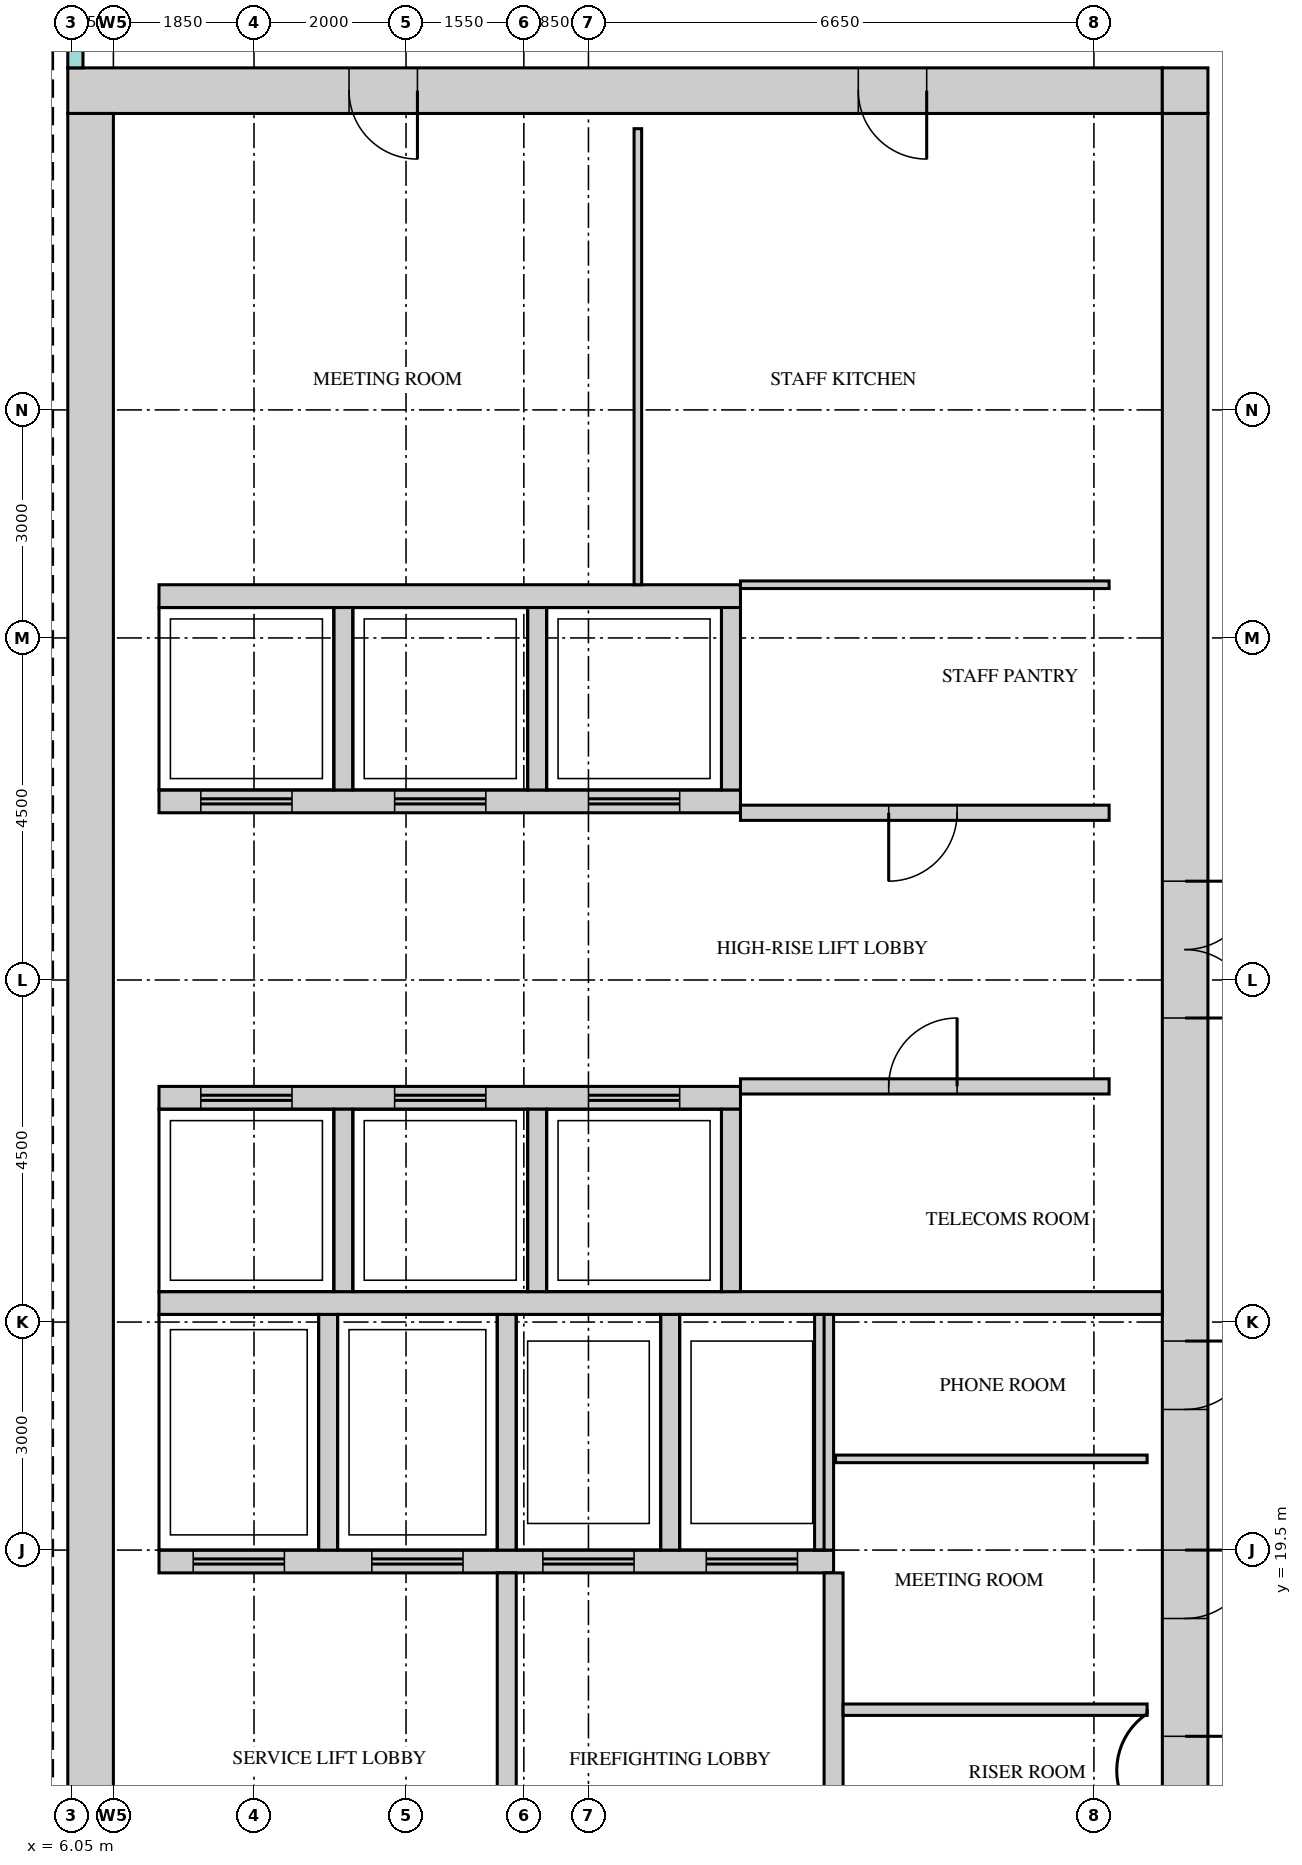
"""IFC4 building model, lengths in metres.
Left out: names, types, materials, properties, quantities, classifications, styles, units other than length and angle.
Written with IfcOpenShell. Run it as: python <this file> out.ifc"""

import sys

from ifc_helpers import new_model, si_unit, direction, frame, frame_2d, origin, place, context, subcontext, project, spatial, rectangle, extrude, source, transform, mapped, element, fill, save


model = new_model("IFC4")
c1 = context("Model", 3, precision=1e-05, world=origin(), true_north=direction((0.0, 1.0)))
c2 = subcontext(c1, "Body", "Model", "MODEL_VIEW")
j1 = project(units=[si_unit("LENGTHUNIT", "METRE"), si_unit("PLANEANGLEUNIT", "RADIAN")], contexts=[c1])
p1 = place(None, origin())
s1 = spatial("IfcSite", under=j1, at=p1, CompositionType="ELEMENT")
p2 = place(p1, origin())
s2 = spatial("IfcBuilding", under=s1, at=p2, CompositionType="ELEMENT")
p3 = place(p2, frame((0.0, 0.0, 314.2)))
s3 = spatial("IfcBuildingStorey", under=s2, at=p3, CompositionType="ELEMENT", Elevation=314.2)
m1 = source(origin(), c2, "Body", "SweptSolid", [
    extrude(rectangle(XDim=14.4, YDim=0.6, at=frame_2d((7.2, 0.0))), origin(), (0.0, 0.0, 1.0), 3.75),
])
p4 = place(p3, frame((6.0, 38.7, 0.0), z_axis=(0.0, 0.0, 1.0), x_axis=(1.0, 0.0, 0.0)))
e1 = element("IfcWall", 1, at=p4, inside=s3, PredefinedType="SHEAR", context=c2, shape_type="MappedRepresentation", body=[
    mapped(m1, transform((0.0, 0.0, 0.0))),
])
m2 = source(origin(), c2, "Body", "SweptSolid", [
    extrude(rectangle(XDim=0.9, YDim=2.1, at=frame_2d((0.45, 1.05))), frame((0.0, 0.31, 0.0), z_axis=(0.0, -1.0, 0.0), x_axis=(1.0, 0.0, 0.0)), (0.0, 0.0, 1.0), 0.62),
])
p5 = place(p4, frame((3.7, 0.0, 0.0)))
e2 = element("IfcOpeningElement", 2, at=p5, cuts=e1, PredefinedType="OPENING", context=c2, shape_type="MappedRepresentation", body=[
    mapped(m2, transform((0.0, 0.0, 0.0))),
])
p6 = place(p4, frame((10.4, 0.0, 0.0)))
e3 = element("IfcOpeningElement", 3, at=p6, cuts=e1, PredefinedType="OPENING", context=c2, shape_type="MappedRepresentation", body=[
    mapped(m2, transform((0.0, 0.0, 0.0))),
])
m3 = source(origin(), c2, "Body", "SweptSolid", [
    extrude(rectangle(XDim=0.6, YDim=0.6, at=frame_2d((0.3, 0.0))), origin(), (0.0, 0.0, 1.0), 3.75),
])
p7 = place(p3, frame((20.4, 38.7, 0.0), z_axis=(0.0, 0.0, 1.0), x_axis=(1.0, 0.0, 0.0)))
e4 = element("IfcWall", 4, at=p7, inside=s3, PredefinedType="SHEAR", context=c2, shape_type="MappedRepresentation", body=[
    mapped(m3, transform((0.0, 0.0, 0.0))),
])
m4 = source(origin(), c2, "Body", "SweptSolid", [
    extrude(rectangle(XDim=22.8, YDim=0.6, at=frame_2d((11.4, 0.0))), origin(), (0.0, 0.0, 1.0), 3.75),
])
p8 = place(p3, frame((20.7, 15.6, 0.0), z_axis=(0.0, 0.0, 1.0), x_axis=(0.0, 1.0, 0.0)))
e5 = element("IfcWall", 5, at=p8, inside=s3, PredefinedType="SHEAR", context=c2, shape_type="MappedRepresentation", body=[
    mapped(m4, transform((0.0, 0.0, 0.0))),
])
m5 = source(origin(), c2, "Body", "SweptSolid", [
    extrude(rectangle(XDim=1.8, YDim=2.1, at=frame_2d((0.9, 1.05))), frame((0.0, 0.31, 0.0), z_axis=(0.0, -1.0, 0.0), x_axis=(1.0, 0.0, 0.0)), (0.0, 0.0, 1.0), 0.62),
])
p9 = place(p8, frame((10.9, 0.0, 0.0)))
e6 = element("IfcOpeningElement", 6, at=p9, cuts=e5, PredefinedType="OPENING", context=c2, shape_type="MappedRepresentation", body=[
    mapped(m5, transform((0.0, 0.0, 0.0))),
])
p10 = place(p8, frame((0.55, 0.0, 0.0)))
e7 = element("IfcOpeningElement", 7, at=p10, cuts=e5, PredefinedType="OPENING", context=c2, shape_type="MappedRepresentation", body=[
    mapped(m2, transform((0.0, 0.0, 0.0))),
])
p11 = place(p8, frame((3.0, 0.0, 0.0)))
e8 = element("IfcOpeningElement", 8, at=p11, cuts=e5, PredefinedType="OPENING", context=c2, shape_type="MappedRepresentation", body=[
    mapped(m2, transform((0.0, 0.0, 0.0))),
])
p12 = place(p8, frame((5.75, 0.0, 0.0)))
e9 = element("IfcOpeningElement", 9, at=p12, cuts=e5, PredefinedType="OPENING", context=c2, shape_type="MappedRepresentation", body=[
    mapped(m2, transform((0.0, 0.0, 0.0))),
])
p13 = place(p3, frame((6.3, 15.6, 0.0), z_axis=(0.0, 0.0, 1.0), x_axis=(0.0, 1.0, 0.0)))
e10 = element("IfcWall", 10, at=p13, inside=s3, PredefinedType="SHEAR", context=c2, shape_type="MappedRepresentation", body=[
    mapped(m4, transform((0.0, 0.0, 0.0))),
])
m6 = source(origin(), c2, "Body", "SweptSolid", [
    extrude(rectangle(XDim=13.2, YDim=0.3, at=frame_2d((6.6, 0.0))), origin(), (0.0, 0.0, 1.0), 3.75),
])
p14 = place(p3, frame((7.2, 22.75, 0.0), z_axis=(0.0, 0.0, 1.0), x_axis=(1.0, 0.0, 0.0)))
e11 = element("IfcWall", 11, at=p14, inside=s3, PredefinedType="STANDARD", context=c2, shape_type="MappedRepresentation", body=[
    mapped(m6, transform((0.0, 0.0, 0.0))),
])
m7 = source(origin(), c2, "Body", "SweptSolid", [
    extrude(rectangle(XDim=8.875, YDim=0.3, at=frame_2d((4.438, 0.0))), origin(), (0.0, 0.0, 1.0), 3.75),
])
p15 = place(p3, frame((7.2, 19.35, 0.0), z_axis=(0.0, 0.0, 1.0), x_axis=(1.0, 0.0, 0.0)))
e12 = element("IfcWall", 12, at=p15, inside=s3, PredefinedType="STANDARD", context=c2, shape_type="MappedRepresentation", body=[
    mapped(m7, transform((0.0, 0.0, 0.0))),
])
m8 = source(origin(), c2, "Body", "SweptSolid", [
    extrude(rectangle(XDim=1.2, YDim=2.1, at=frame_2d((0.6, 1.05))), frame((0.0, 0.16, 0.0), z_axis=(0.0, -1.0, 0.0), x_axis=(1.0, 0.0, 0.0)), (0.0, 0.0, 1.0), 0.32),
])
p16 = place(p15, frame((0.45, 0.0, 0.0)))
e13 = element("IfcOpeningElement", 13, at=p16, cuts=e12, PredefinedType="OPENING", context=c2, shape_type="MappedRepresentation", body=[
    mapped(m8, transform((0.0, 0.0, 0.0))),
])
p17 = place(p15, frame((2.8, 0.0, 0.0)))
e14 = element("IfcOpeningElement", 14, at=p17, cuts=e12, PredefinedType="OPENING", context=c2, shape_type="MappedRepresentation", body=[
    mapped(m8, transform((0.0, 0.0, 0.0))),
])
p18 = place(p15, frame((5.05, 0.0, 0.0)))
e15 = element("IfcOpeningElement", 15, at=p18, cuts=e12, PredefinedType="OPENING", context=c2, shape_type="MappedRepresentation", body=[
    mapped(m8, transform((0.0, 0.0, 0.0))),
])
p19 = place(p15, frame((7.2, 0.0, 0.0)))
e16 = element("IfcOpeningElement", 16, at=p19, cuts=e12, PredefinedType="OPENING", context=c2, shape_type="MappedRepresentation", body=[
    mapped(m8, transform((0.0, 0.0, 0.0))),
])
m9 = source(origin(), c2, "Body", "SweptSolid", [
    extrude(rectangle(XDim=7.65, YDim=0.3, at=frame_2d((3.825, 0.0))), origin(), (0.0, 0.0, 1.0), 3.75),
])
p20 = place(p3, frame((7.2, 32.05, 0.0), z_axis=(0.0, 0.0, 1.0), x_axis=(1.0, 0.0, 0.0)))
e17 = element("IfcWall", 17, at=p20, inside=s3, PredefinedType="STANDARD", context=c2, shape_type="MappedRepresentation", body=[
    mapped(m9, transform((0.0, 0.0, 0.0))),
])
p21 = place(p3, frame((7.2, 29.35, 0.0), z_axis=(0.0, 0.0, 1.0), x_axis=(1.0, 0.0, 0.0)))
e18 = element("IfcWall", 18, at=p21, inside=s3, PredefinedType="STANDARD", context=c2, shape_type="MappedRepresentation", body=[
    mapped(m9, transform((0.0, 0.0, 0.0))),
])
p22 = place(p21, frame((0.55, 0.0, 0.0)))
e19 = element("IfcOpeningElement", 19, at=p22, cuts=e18, PredefinedType="OPENING", context=c2, shape_type="MappedRepresentation", body=[
    mapped(m8, transform((0.0, 0.0, 0.0))),
])
p23 = place(p21, frame((3.1, 0.0, 0.0)))
e20 = element("IfcOpeningElement", 20, at=p23, cuts=e18, PredefinedType="OPENING", context=c2, shape_type="MappedRepresentation", body=[
    mapped(m8, transform((0.0, 0.0, 0.0))),
])
p24 = place(p21, frame((5.65, 0.0, 0.0)))
e21 = element("IfcOpeningElement", 21, at=p24, cuts=e18, PredefinedType="OPENING", context=c2, shape_type="MappedRepresentation", body=[
    mapped(m8, transform((0.0, 0.0, 0.0))),
])
p25 = place(p3, frame((7.2, 25.45, 0.0), z_axis=(0.0, 0.0, 1.0), x_axis=(1.0, 0.0, 0.0)))
e22 = element("IfcWall", 22, at=p25, inside=s3, PredefinedType="STANDARD", context=c2, shape_type="MappedRepresentation", body=[
    mapped(m9, transform((0.0, 0.0, 0.0))),
])
p26 = place(p25, frame((0.55, 0.0, 0.0)))
e23 = element("IfcOpeningElement", 23, at=p26, cuts=e22, PredefinedType="OPENING", context=c2, shape_type="MappedRepresentation", body=[
    mapped(m8, transform((0.0, 0.0, 0.0))),
])
p27 = place(p25, frame((3.1, 0.0, 0.0)))
e24 = element("IfcOpeningElement", 24, at=p27, cuts=e22, PredefinedType="OPENING", context=c2, shape_type="MappedRepresentation", body=[
    mapped(m8, transform((0.0, 0.0, 0.0))),
])
p28 = place(p25, frame((5.65, 0.0, 0.0)))
e25 = element("IfcOpeningElement", 25, at=p28, cuts=e22, PredefinedType="OPENING", context=c2, shape_type="MappedRepresentation", body=[
    mapped(m8, transform((0.0, 0.0, 0.0))),
])
m10 = source(origin(), c2, "Body", "SweptSolid", [
    extrude(rectangle(XDim=3.1, YDim=0.25, at=frame_2d((1.55, 0.0))), origin(), (0.0, 0.0, 1.0), 3.75),
])
for number, where, z_axis, x_axis in (
    (26, (9.425, 19.5, 0.0), (0.0, 0.0, 1.0), (0.0, 1.0, 0.0)),
    (27, (11.775, 19.5, 0.0), (0.0, 0.0, 1.0), (0.0, 1.0, 0.0)),
    (28, (13.925, 19.5, 0.0), (0.0, 0.0, 1.0), (0.0, 1.0, 0.0)),
    (29, (15.95, 19.5, 0.0), (0.0, 0.0, 1.0), (0.0, 1.0, 0.0)),
):
    element("IfcWall", number, at=place(p3, frame(where, z_axis=z_axis, x_axis=x_axis)), inside=s3, PredefinedType="STANDARD", context=c2, shape_type="MappedRepresentation", body=[
        mapped(m10, transform((0.0, 0.0, 0.0))),
    ])
m11 = source(origin(), c2, "Body", "SweptSolid", [
    extrude(rectangle(XDim=2.4, YDim=0.25, at=frame_2d((1.2, 0.0))), origin(), (0.0, 0.0, 1.0), 3.75),
])
for number, where, z_axis, x_axis in (
    (30, (9.625, 29.5, 0.0), (0.0, 0.0, 1.0), (0.0, 1.0, 0.0)),
    (31, (12.175, 29.5, 0.0), (0.0, 0.0, 1.0), (0.0, 1.0, 0.0)),
    (32, (14.725, 29.5, 0.0), (0.0, 0.0, 1.0), (0.0, 1.0, 0.0)),
):
    element("IfcWall", number, at=place(p3, frame(where, z_axis=z_axis, x_axis=x_axis)), inside=s3, PredefinedType="STANDARD", context=c2, shape_type="MappedRepresentation", body=[
        mapped(m11, transform((0.0, 0.0, 0.0))),
    ])
m12 = source(origin(), c2, "Body", "SweptSolid", [
    extrude(rectangle(XDim=2.4, YDim=0.25, at=frame_2d((1.2, 0.0))), origin(), (0.0, 0.0, 1.0), 3.75),
])
for number, where, z_axis, x_axis in (
    (33, (9.625, 22.9, 0.0), (0.0, 0.0, 1.0), (0.0, 1.0, 0.0)),
    (34, (12.175, 22.9, 0.0), (0.0, 0.0, 1.0), (0.0, 1.0, 0.0)),
    (35, (14.725, 22.9, 0.0), (0.0, 0.0, 1.0), (0.0, 1.0, 0.0)),
):
    element("IfcWall", number, at=place(p3, frame(where, z_axis=z_axis, x_axis=x_axis)), inside=s3, PredefinedType="STANDARD", context=c2, shape_type="MappedRepresentation", body=[
        mapped(m12, transform((0.0, 0.0, 0.0))),
    ])
m13 = source(origin(), c2, "Body", "SweptSolid", [
    extrude(rectangle(XDim=3.6, YDim=0.25, at=frame_2d((1.8, 0.0))), origin(), (0.0, 0.0, 1.0), 3.75),
])
for number, where, z_axis, x_axis in (
    (36, (16.075, 15.6, 0.0), (0.0, 0.0, 1.0), (0.0, 1.0, 0.0)),
    (37, (11.775, 15.6, 0.0), (0.0, 0.0, 1.0), (0.0, 1.0, 0.0)),
):
    element("IfcWall", number, at=place(p3, frame(where, z_axis=z_axis, x_axis=x_axis)), inside=s3, PredefinedType="STANDARD", context=c2, shape_type="MappedRepresentation", body=[
        mapped(m13, transform((0.0, 0.0, 0.0))),
    ])
m14 = source(origin(), c2, "Body", "SweptSolid", [
    extrude(rectangle(XDim=4.0, YDim=0.15, at=frame_2d((2.0, 0.0))), origin(), (0.0, 0.0, 1.0), 3.8),
])
p29 = place(p3, frame((16.2, 17.4, 0.0), z_axis=(0.0, 0.0, 1.0), x_axis=(1.0, 0.0, 0.0)))
e38 = element("IfcWall", 38, at=p29, inside=s3, PredefinedType="PARTITIONING", context=c2, shape_type="MappedRepresentation", body=[
    mapped(m14, transform((0.0, 0.0, 0.0))),
])
m15 = source(origin(), c2, "Body", "SweptSolid", [
    extrude(rectangle(XDim=4.1, YDim=0.1, at=frame_2d((2.05, 0.0))), origin(), (0.0, 0.0, 1.0), 3.8),
])
p30 = place(p3, frame((16.1, 20.7, 0.0), z_axis=(0.0, 0.0, 1.0), x_axis=(1.0, 0.0, 0.0)))
e39 = element("IfcWall", 39, at=p30, inside=s3, PredefinedType="PARTITIONING", context=c2, shape_type="MappedRepresentation", body=[
    mapped(m15, transform((0.0, 0.0, 0.0))),
])
m16 = source(origin(), c2, "Body", "SweptSolid", [
    extrude(rectangle(XDim=4.85, YDim=0.2, at=frame_2d((2.425, 0.0))), origin(), (0.0, 0.0, 1.0), 3.8),
])
p31 = place(p3, frame((14.85, 25.6, 0.0), z_axis=(0.0, 0.0, 1.0), x_axis=(1.0, 0.0, 0.0)))
e40 = element("IfcWall", 40, at=p31, inside=s3, PredefinedType="PARTITIONING", context=c2, shape_type="MappedRepresentation", body=[
    mapped(m16, transform((0.0, 0.0, 0.0))),
])
m17 = source(origin(), c2, "Body", "SweptSolid", [
    extrude(rectangle(XDim=0.9, YDim=2.1, at=frame_2d((0.45, 1.05))), frame((0.0, 0.11, 0.0), z_axis=(0.0, -1.0, 0.0), x_axis=(1.0, 0.0, 0.0)), (0.0, 0.0, 1.0), 0.22),
])
p32 = place(p31, frame((1.95, 0.0, 0.0)))
e41 = element("IfcOpeningElement", 41, at=p32, cuts=e40, PredefinedType="OPENING", context=c2, shape_type="MappedRepresentation", body=[
    mapped(m17, transform((0.0, 0.0, 0.0))),
])
p33 = place(p3, frame((14.85, 29.2, 0.0), z_axis=(0.0, 0.0, 1.0), x_axis=(1.0, 0.0, 0.0)))
e42 = element("IfcWall", 42, at=p33, inside=s3, PredefinedType="PARTITIONING", context=c2, shape_type="MappedRepresentation", body=[
    mapped(m16, transform((0.0, 0.0, 0.0))),
])
p34 = place(p33, frame((1.95, 0.0, 0.0)))
e43 = element("IfcOpeningElement", 43, at=p34, cuts=e42, PredefinedType="OPENING", context=c2, shape_type="MappedRepresentation", body=[
    mapped(m17, transform((0.0, 0.0, 0.0))),
])
m18 = source(origin(), c2, "Body", "SweptSolid", [
    extrude(rectangle(XDim=6.0, YDim=0.1, at=frame_2d((3.0, 0.0))), origin(), (0.0, 0.0, 1.0), 3.8),
])
p35 = place(p3, frame((13.5, 32.2, 0.0), z_axis=(0.0, 0.0, 1.0), x_axis=(0.0, 1.0, 0.0)))
e44 = element("IfcWall", 44, at=p35, inside=s3, PredefinedType="PARTITIONING", context=c2, shape_type="MappedRepresentation", body=[
    mapped(m18, transform((0.0, 0.0, 0.0))),
])
m19 = source(origin(), c2, "Body", "SweptSolid", [
    extrude(rectangle(XDim=4.85, YDim=0.1, at=frame_2d((2.425, 0.0))), origin(), (0.0, 0.0, 1.0), 3.8),
])
p36 = place(p3, frame((14.85, 32.2, 0.0), z_axis=(0.0, 0.0, 1.0), x_axis=(1.0, 0.0, 0.0)))
e45 = element("IfcWall", 45, at=p36, inside=s3, PredefinedType="PARTITIONING", context=c2, shape_type="MappedRepresentation", body=[
    mapped(m19, transform((0.0, 0.0, 0.0))),
])
m20 = source(origin(), c2, "Body", "SweptSolid", [
    extrude(rectangle(XDim=0.9, YDim=2.1, at=frame_2d((0.45, 1.05))), frame((0.0, 0.025, 0.0), z_axis=(0.0, -1.0, 0.0), x_axis=(1.0, 0.0, 0.0)), (0.0, 0.0, 1.0), 0.05),
])
p37 = place(p32, origin())
e46 = element("IfcDoor", 46, at=p37, inside=s3, OperationType="SINGLE_SWING_LEFT", PredefinedType="DOOR", context=c2, shape_type="MappedRepresentation", body=[
    mapped(m20, transform((0.0, 0.0, 0.0))),
])
fill(e41, e46)
p38 = place(p34, origin())
e47 = element("IfcDoor", 47, at=p38, inside=s3, OperationType="SINGLE_SWING_LEFT", PredefinedType="DOOR", context=c2, shape_type="MappedRepresentation", body=[
    mapped(m20, transform((0.0, 0.0, 0.0))),
])
fill(e43, e47)
m21 = source(origin(), c2, "Body", "SweptSolid", [
    extrude(rectangle(XDim=1.8, YDim=2.1, at=frame_2d((0.9, 1.05))), frame((0.0, 0.25, 0.0), z_axis=(0.0, -1.0, 0.0), x_axis=(1.0, 0.0, 0.0)), (0.0, 0.0, 1.0), 0.5),
])
p39 = place(p9, origin())
e48 = element("IfcDoor", 48, at=p39, inside=s3, OperationType="DOUBLE_DOOR_SINGLE_SWING", PredefinedType="DOOR", context=c2, shape_type="MappedRepresentation", body=[
    mapped(m21, transform((0.0, 0.0, 0.0))),
])
fill(e6, e48)
m22 = source(origin(), c2, "Body", "SweptSolid", [
    extrude(rectangle(XDim=0.9, YDim=2.1, at=frame_2d((0.45, 1.05))), frame((0.0, 0.25, 0.0), z_axis=(0.0, -1.0, 0.0), x_axis=(1.0, 0.0, 0.0)), (0.0, 0.0, 1.0), 0.5),
])
p40 = place(p5, origin())
e49 = element("IfcDoor", 49, at=p40, inside=s3, OperationType="SINGLE_SWING_RIGHT", PredefinedType="DOOR", context=c2, shape_type="MappedRepresentation", body=[
    mapped(m22, transform((0.0, 0.0, 0.0))),
])
fill(e2, e49)
p41 = place(p6, origin())
e50 = element("IfcDoor", 50, at=p41, inside=s3, OperationType="SINGLE_SWING_RIGHT", PredefinedType="DOOR", context=c2, shape_type="MappedRepresentation", body=[
    mapped(m22, transform((0.0, 0.0, 0.0))),
])
fill(e3, e50)
p42 = place(p10, origin())
e51 = element("IfcDoor", 51, at=p42, inside=s3, OperationType="SINGLE_SWING_RIGHT", PredefinedType="DOOR", context=c2, shape_type="MappedRepresentation", body=[
    mapped(m22, transform((0.0, 0.0, 0.0))),
])
fill(e7, e51)
p43 = place(p11, origin())
e52 = element("IfcDoor", 52, at=p43, inside=s3, OperationType="SINGLE_SWING_RIGHT", PredefinedType="DOOR", context=c2, shape_type="MappedRepresentation", body=[
    mapped(m22, transform((0.0, 0.0, 0.0))),
])
fill(e8, e52)
p44 = place(p12, origin())
e53 = element("IfcDoor", 53, at=p44, inside=s3, OperationType="SINGLE_SWING_RIGHT", PredefinedType="DOOR", context=c2, shape_type="MappedRepresentation", body=[
    mapped(m22, transform((0.0, 0.0, 0.0))),
])
fill(e9, e53)
m23 = source(origin(), c2, "Body", "SweptSolid", [
    extrude(rectangle(XDim=1.2, YDim=2.1, at=frame_2d((0.6, 1.05))), frame((0.0, 0.025, 0.0), z_axis=(0.0, -1.0, 0.0), x_axis=(1.0, 0.0, 0.0)), (0.0, 0.0, 1.0), 0.05),
])
p45 = place(p26, origin())
e54 = element("IfcDoor", 54, at=p45, inside=s3, OperationType="DOUBLE_DOOR_SLIDING", PredefinedType="DOOR", context=c2, shape_type="MappedRepresentation", body=[
    mapped(m23, transform((0.0, 0.0, 0.0))),
])
fill(e23, e54)
p46 = place(p27, origin())
e55 = element("IfcDoor", 55, at=p46, inside=s3, OperationType="DOUBLE_DOOR_SLIDING", PredefinedType="DOOR", context=c2, shape_type="MappedRepresentation", body=[
    mapped(m23, transform((0.0, 0.0, 0.0))),
])
fill(e24, e55)
p47 = place(p28, origin())
e56 = element("IfcDoor", 56, at=p47, inside=s3, OperationType="DOUBLE_DOOR_SLIDING", PredefinedType="DOOR", context=c2, shape_type="MappedRepresentation", body=[
    mapped(m23, transform((0.0, 0.0, 0.0))),
])
fill(e25, e56)
p48 = place(p22, origin())
e57 = element("IfcDoor", 57, at=p48, inside=s3, OperationType="DOUBLE_DOOR_SLIDING", PredefinedType="DOOR", context=c2, shape_type="MappedRepresentation", body=[
    mapped(m23, transform((0.0, 0.0, 0.0))),
])
fill(e19, e57)
p49 = place(p23, origin())
e58 = element("IfcDoor", 58, at=p49, inside=s3, OperationType="DOUBLE_DOOR_SLIDING", PredefinedType="DOOR", context=c2, shape_type="MappedRepresentation", body=[
    mapped(m23, transform((0.0, 0.0, 0.0))),
])
fill(e20, e58)
p50 = place(p24, origin())
e59 = element("IfcDoor", 59, at=p50, inside=s3, OperationType="DOUBLE_DOOR_SLIDING", PredefinedType="DOOR", context=c2, shape_type="MappedRepresentation", body=[
    mapped(m23, transform((0.0, 0.0, 0.0))),
])
fill(e21, e59)
p51 = place(p16, origin())
e60 = element("IfcDoor", 60, at=p51, inside=s3, OperationType="DOUBLE_DOOR_SLIDING", PredefinedType="DOOR", context=c2, shape_type="MappedRepresentation", body=[
    mapped(m23, transform((0.0, 0.0, 0.0))),
])
fill(e13, e60)
p52 = place(p17, origin())
e61 = element("IfcDoor", 61, at=p52, inside=s3, OperationType="DOUBLE_DOOR_SLIDING", PredefinedType="DOOR", context=c2, shape_type="MappedRepresentation", body=[
    mapped(m23, transform((0.0, 0.0, 0.0))),
])
fill(e14, e61)
p53 = place(p18, origin())
e62 = element("IfcDoor", 62, at=p53, inside=s3, OperationType="DOUBLE_DOOR_SLIDING", PredefinedType="DOOR", context=c2, shape_type="MappedRepresentation", body=[
    mapped(m23, transform((0.0, 0.0, 0.0))),
])
fill(e15, e62)
p54 = place(p19, origin())
e63 = element("IfcDoor", 63, at=p54, inside=s3, OperationType="DOUBLE_DOOR_SLIDING", PredefinedType="DOOR", context=c2, shape_type="MappedRepresentation", body=[
    mapped(m23, transform((0.0, 0.0, 0.0))),
])
fill(e16, e63)
save(model, sys.argv[1])
